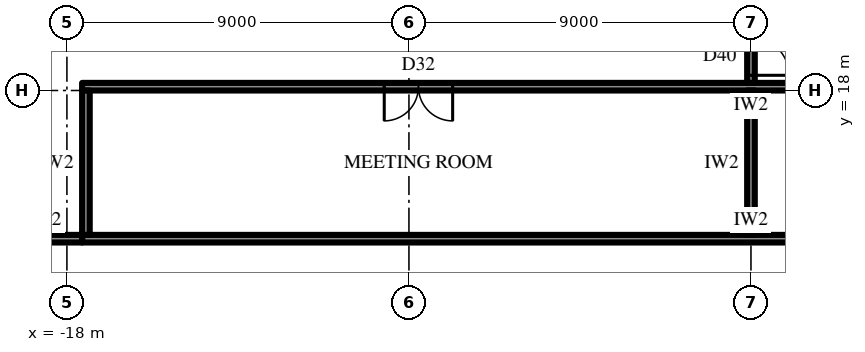
"""IFC4 building model, lengths in metres.
Left out: names, types, materials, properties, quantities, classifications, styles, units other than length and angle.
Written with IfcOpenShell. Run it as: python <this file> out.ifc"""

import sys

from ifc_helpers import new_model, si_unit, direction, frame, frame_2d, origin, place, context, subcontext, project, spatial, rectangle, extrude, element, fill, save


model = new_model("IFC4")
c1 = context("Model", 3, precision=1e-05, world=origin(), true_north=direction((0.0, 1.0)))
c2 = subcontext(c1, "Body", "Model", "MODEL_VIEW")
j1 = project(units=[si_unit("LENGTHUNIT", "METRE"), si_unit("PLANEANGLEUNIT", "RADIAN")], contexts=[c1])
p1 = place(None, origin())
s1 = spatial("IfcSite", under=j1, at=p1, CompositionType="ELEMENT")
p2 = place(p1, origin())
s2 = spatial("IfcBuilding", under=s1, at=p2, CompositionType="ELEMENT")
p3 = place(p2, frame((0.0, 0.0, 36.1)))
s3 = spatial("IfcBuildingStorey", under=s2, at=p3, CompositionType="ELEMENT", Elevation=36.1)
p4 = place(p3, frame((-17.6, 14.1, 0.0), z_axis=(0.0, 0.0, 1.0), x_axis=(1.0, 0.0, 0.0)))
e1 = element("IfcWall", 1, at=p4, inside=s3, PredefinedType="PARTITIONING", context=c2, shape_type="SweptSolid", body=[
    extrude(rectangle(XDim=35.2, YDim=0.2, at=frame_2d((17.6, 0.0))), origin(), (0.0, 0.0, 1.0), 4.0),
])
p5 = place(p3, frame((-17.6, 18.1, 0.0), z_axis=(0.0, 0.0, 1.0), x_axis=(1.0, 0.0, 0.0)))
e2 = element("IfcWall", 2, at=p5, inside=s3, PredefinedType="PARTITIONING", context=c2, shape_type="SweptSolid", body=[
    extrude(rectangle(XDim=35.2, YDim=0.2, at=frame_2d((17.6, 0.0))), origin(), (0.0, 0.0, 1.0), 4.0),
])
p6 = place(p5, frame((7.95, 0.0, 0.0)))
e3 = element("IfcOpeningElement", 3, at=p6, cuts=e2, PredefinedType="OPENING", context=c2, shape_type="SweptSolid", body=[
    extrude(rectangle(XDim=1.8, YDim=2.4, at=frame_2d((0.9, 1.2))), frame((0.0, 0.11, 0.0), z_axis=(0.0, -1.0, 0.0), x_axis=(1.0, 0.0, 0.0)), (0.0, 0.0, 1.0), 0.22),
])
p7 = place(p5, frame((25.45, 0.0, 0.0)))
e4 = element("IfcOpeningElement", 4, at=p7, cuts=e2, PredefinedType="OPENING", context=c2, shape_type="SweptSolid", body=[
    extrude(rectangle(XDim=1.8, YDim=2.4, at=frame_2d((0.9, 1.2))), frame((0.0, 0.11, 0.0), z_axis=(0.0, -1.0, 0.0), x_axis=(1.0, 0.0, 0.0)), (0.0, 0.0, 1.0), 0.22),
])
p8 = place(p3, frame((-17.5, 14.2, 0.0), z_axis=(0.0, 0.0, 1.0), x_axis=(0.0, 1.0, 0.0)))
e5 = element("IfcWall", 5, at=p8, inside=s3, PredefinedType="PARTITIONING", context=c2, shape_type="SweptSolid", body=[
    extrude(rectangle(XDim=3.8, YDim=0.2, at=frame_2d((1.9, 0.0))), origin(), (0.0, 0.0, 1.0), 4.0),
])
p9 = place(p3, frame((0.0, 14.2, 0.0), z_axis=(0.0, 0.0, 1.0), x_axis=(0.0, 1.0, 0.0)))
e6 = element("IfcWall", 6, at=p9, inside=s3, PredefinedType="PARTITIONING", context=c2, shape_type="SweptSolid", body=[
    extrude(rectangle(XDim=3.8, YDim=0.2, at=frame_2d((1.9, 0.0))), origin(), (0.0, 0.0, 1.0), 2.944),
])
p10 = place(p3, frame((-19.6, 14.1, 0.0), z_axis=(0.0, 0.0, 1.0), x_axis=(1.0, 0.0, 0.0)))
e7 = element("IfcWall", 7, at=p10, inside=s3, PredefinedType="PARTITIONING", context=c2, shape_type="SweptSolid", body=[
    extrude(rectangle(XDim=2.0, YDim=0.2, at=frame_2d((1.0, 0.0))), origin(), (0.0, 0.0, 1.0), 4.0),
])
p11 = place(p3, frame((0.0, 18.2, 0.0), z_axis=(0.0, 0.0, 1.0), x_axis=(0.0, 1.0, 0.0)))
e8 = element("IfcWall", 8, at=p11, inside=s3, PredefinedType="PARTITIONING", context=c2, shape_type="SweptSolid", body=[
    extrude(rectangle(XDim=6.7, YDim=0.2, at=frame_2d((3.35, 0.0))), origin(), (0.0, 0.0, 1.0), 2.944),
])
p12 = place(p11, frame((0.2, 0.0, 0.0)))
e9 = element("IfcOpeningElement", 9, at=p12, cuts=e8, PredefinedType="OPENING", context=c2, shape_type="SweptSolid", body=[
    extrude(rectangle(XDim=1.0, YDim=2.2, at=frame_2d((0.5, 1.1))), frame((0.0, 0.11, 0.0), z_axis=(0.0, -1.0, 0.0), x_axis=(1.0, 0.0, 0.0)), (0.0, 0.0, 1.0), 0.22),
])
p13 = place(p6, frame((1.8, 0.0, 0.0), z_axis=(0.0, 0.0, 1.0), x_axis=(-1.0, 0.0, 0.0)))
e10 = element("IfcDoor", 10, at=p13, inside=s3, OperationType="DOUBLE_DOOR_SINGLE_SWING", PredefinedType="DOOR", context=c2, shape_type="SweptSolid", body=[
    extrude(rectangle(XDim=1.8, YDim=2.4, at=frame_2d((0.9, 1.2))), frame((0.0, 0.025, 0.0), z_axis=(0.0, -1.0, 0.0), x_axis=(1.0, 0.0, 0.0)), (0.0, 0.0, 1.0), 0.05),
])
fill(e3, e10)
p14 = place(p12, frame((1.0, 0.0, 0.0), z_axis=(0.0, 0.0, 1.0), x_axis=(-1.0, 0.0, 0.0)))
e11 = element("IfcDoor", 11, at=p14, inside=s3, OperationType="SINGLE_SWING_LEFT", PredefinedType="DOOR", context=c2, shape_type="SweptSolid", body=[
    extrude(rectangle(XDim=1.0, YDim=2.2, at=frame_2d((0.5, 1.1))), frame((0.0, 0.025, 0.0), z_axis=(0.0, -1.0, 0.0), x_axis=(1.0, 0.0, 0.0)), (0.0, 0.0, 1.0), 0.05),
])
fill(e9, e11)
save(model, sys.argv[1])
